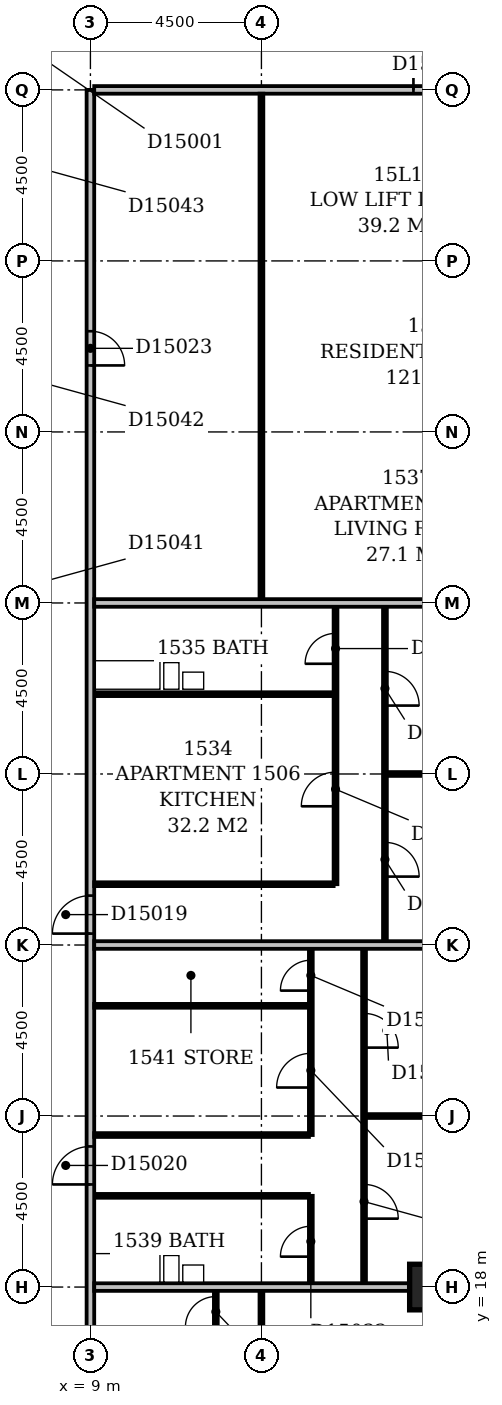
"""IFC4 building model, lengths in metres.
Left out: names, types, materials, properties, quantities, classifications, styles, units other than length and angle.
Written with IfcOpenShell. Run it as: python <this file> out.ifc"""

import sys

from ifc_helpers import new_model, si_unit, direction, frame, frame_2d, origin, origin_2d, place, context, subcontext, project, spatial, rectangle, extrude, element, fill, save


model = new_model("IFC4")
c1 = context("Model", 3, precision=1e-05, world=origin(), true_north=direction((0.0, 1.0)))
c2 = subcontext(c1, "Body", "Model", "MODEL_VIEW")
j1 = project(units=[si_unit("LENGTHUNIT", "METRE"), si_unit("PLANEANGLEUNIT", "RADIAN")], contexts=[c1])
p1 = place(None, origin())
s1 = spatial("IfcSite", under=j1, at=p1, CompositionType="ELEMENT")
p2 = place(p1, origin())
s2 = spatial("IfcBuilding", under=s1, at=p2, CompositionType="ELEMENT")
p3 = place(p2, frame((0.0, 0.0, 65.0)))
s3 = spatial("IfcBuildingStorey", under=s2, at=p3, CompositionType="ELEMENT", Elevation=65.0)
p4 = place(p3, frame((18.0, 18.0, -0.3), z_axis=(0.0, 0.0, 1.0), x_axis=(1.0, 0.0, 0.0)))
e1 = element("IfcColumn", 1, at=p4, inside=s3, PredefinedType="COLUMN", context=c2, shape_type="SweptSolid", body=[
    extrude(rectangle(XDim=1.2, YDim=1.2, at=origin_2d()), origin(), (0.0, 0.0, 1.0), 3.6),
])
p5 = place(p3, frame((9.0, 5.0, 0.0), z_axis=(0.0, 0.0, 1.0), x_axis=(0.0, 1.0, 0.0)))
e2 = element("IfcWall", 2, at=p5, inside=s3, PredefinedType="PARTITIONING", context=c2, shape_type="SweptSolid", body=[
    extrude(rectangle(XDim=44.5, YDim=0.2, at=frame_2d((22.25, 0.0))), origin(), (0.0, 0.0, 1.0), 3.3),
])
p6 = place(p5, frame((22.3, 0.0, 0.0)))
e3 = element("IfcOpeningElement", 3, at=p6, cuts=e2, PredefinedType="OPENING", context=c2, shape_type="SweptSolid", body=[
    extrude(rectangle(XDim=1.0, YDim=2.1, at=frame_2d((0.5, 1.05))), frame((0.0, 0.112, 0.0), z_axis=(0.0, -1.0, 0.0), x_axis=(1.0, 0.0, 0.0)), (0.0, 0.0, 1.0), 0.224),
])
p7 = place(p5, frame((15.7, 0.0, 0.0)))
e4 = element("IfcOpeningElement", 4, at=p7, cuts=e2, PredefinedType="OPENING", context=c2, shape_type="SweptSolid", body=[
    extrude(rectangle(XDim=1.0, YDim=2.1, at=frame_2d((0.5, 1.05))), frame((0.0, 0.112, 0.0), z_axis=(0.0, -1.0, 0.0), x_axis=(1.0, 0.0, 0.0)), (0.0, 0.0, 1.0), 0.224),
])
p8 = place(p5, frame((10.45, 0.0, 0.0)))
e5 = element("IfcOpeningElement", 5, at=p8, cuts=e2, PredefinedType="OPENING", context=c2, shape_type="SweptSolid", body=[
    extrude(rectangle(XDim=1.0, YDim=2.1, at=frame_2d((0.5, 1.05))), frame((0.0, 0.112, 0.0), z_axis=(0.0, -1.0, 0.0), x_axis=(1.0, 0.0, 0.0)), (0.0, 0.0, 1.0), 0.224),
])
p9 = place(p5, frame((5.95, 0.0, 0.0)))
e6 = element("IfcOpeningElement", 6, at=p9, cuts=e2, PredefinedType="OPENING", context=c2, shape_type="SweptSolid", body=[
    extrude(rectangle(XDim=1.0, YDim=2.1, at=frame_2d((0.5, 1.05))), frame((0.0, 0.112, 0.0), z_axis=(0.0, -1.0, 0.0), x_axis=(1.0, 0.0, 0.0)), (0.0, 0.0, 1.0), 0.224),
])
p10 = place(p5, frame((37.25, 0.0, 0.0)))
e7 = element("IfcOpeningElement", 7, at=p10, cuts=e2, PredefinedType="OPENING", context=c2, shape_type="SweptSolid", body=[
    extrude(rectangle(XDim=0.9, YDim=2.1, at=frame_2d((0.45, 1.05))), frame((0.0, 0.112, 0.0), z_axis=(0.0, -1.0, 0.0), x_axis=(1.0, 0.0, 0.0)), (0.0, 0.0, 1.0), 0.224),
])
p11 = place(p5, frame((1.5, 0.0, 0.0)))
e8 = element("IfcOpeningElement", 8, at=p11, cuts=e2, PredefinedType="OPENING", context=c2, shape_type="SweptSolid", body=[
    extrude(rectangle(XDim=0.9, YDim=2.1, at=frame_2d((0.45, 1.05))), frame((0.0, 0.112, 0.0), z_axis=(0.0, -1.0, 0.0), x_axis=(1.0, 0.0, 0.0)), (0.0, 0.0, 1.0), 0.224),
])
p12 = place(p3, frame((13.5, 9.6, 0.0), z_axis=(0.0, 0.0, 1.0), x_axis=(0.0, 1.0, 0.0)))
e9 = element("IfcWall", 9, at=p12, inside=s3, PredefinedType="PARTITIONING", context=c2, shape_type="SweptSolid", body=[
    extrude(rectangle(XDim=8.3, YDim=0.1, at=frame_2d((4.15, 0.0))), origin(), (0.0, 0.0, 1.0), 3.3),
])
p13 = place(p12, frame((5.7, 0.0, 0.0)))
e10 = element("IfcOpeningElement", 10, at=p13, cuts=e9, PredefinedType="OPENING", context=c2, shape_type="SweptSolid", body=[
    extrude(rectangle(XDim=0.9, YDim=2.1, at=frame_2d((0.45, 1.05))), frame((0.0, 0.062, 0.0), z_axis=(0.0, -1.0, 0.0), x_axis=(1.0, 0.0, 0.0)), (0.0, 0.0, 1.0), 0.124),
])
p14 = place(p12, frame((1.2, 0.0, 0.0)))
e11 = element("IfcOpeningElement", 11, at=p14, cuts=e9, PredefinedType="OPENING", context=c2, shape_type="SweptSolid", body=[
    extrude(rectangle(XDim=0.9, YDim=2.1, at=frame_2d((0.45, 1.05))), frame((0.0, 0.062, 0.0), z_axis=(0.0, -1.0, 0.0), x_axis=(1.0, 0.0, 0.0)), (0.0, 0.0, 1.0), 0.124),
])
p15 = place(p3, frame((12.3, 16.7, 0.0), z_axis=(0.0, 0.0, 1.0), x_axis=(0.0, 1.0, 0.0)))
e12 = element("IfcWall", 12, at=p15, inside=s3, PredefinedType="PARTITIONING", context=c2, shape_type="SweptSolid", body=[
    extrude(rectangle(XDim=1.2, YDim=0.1, at=frame_2d((0.6, 0.0))), origin(), (0.0, 0.0, 1.0), 3.3),
])
p16 = place(p15, frame((0.25, 0.0, 0.0)))
e13 = element("IfcOpeningElement", 13, at=p16, cuts=e12, PredefinedType="OPENING", context=c2, shape_type="SweptSolid", body=[
    extrude(rectangle(XDim=0.8, YDim=2.1, at=frame_2d((0.4, 1.05))), frame((0.0, 0.062, 0.0), z_axis=(0.0, -1.0, 0.0), x_axis=(1.0, 0.0, 0.0)), (0.0, 0.0, 1.0), 0.124),
])
p17 = place(p3, frame((9.1, 18.0, 0.0), z_axis=(0.0, 0.0, 1.0), x_axis=(1.0, 0.0, 0.0)))
e14 = element("IfcWall", 14, at=p17, inside=s3, PredefinedType="PARTITIONING", context=c2, shape_type="SweptSolid", body=[
    extrude(rectangle(XDim=8.3, YDim=0.2, at=frame_2d((4.15, 0.0))), origin(), (0.0, 0.0, 1.0), 2.6),
])
p18 = place(p3, frame((14.8, 18.1, 0.0), z_axis=(0.0, 0.0, 1.0), x_axis=(0.0, 1.0, 0.0)))
e15 = element("IfcWall", 15, at=p18, inside=s3, PredefinedType="PARTITIONING", context=c2, shape_type="SweptSolid", body=[
    extrude(rectangle(XDim=2.3, YDim=0.1, at=frame_2d((1.15, 0.0))), origin(), (0.0, 0.0, 1.0), 3.3),
])
p19 = place(p18, frame((0.7, 0.0, 0.0)))
e16 = element("IfcOpeningElement", 16, at=p19, cuts=e15, PredefinedType="OPENING", context=c2, shape_type="SweptSolid", body=[
    extrude(rectangle(XDim=0.8, YDim=2.1, at=frame_2d((0.4, 1.05))), frame((0.0, 0.062, 0.0), z_axis=(0.0, -1.0, 0.0), x_axis=(1.0, 0.0, 0.0)), (0.0, 0.0, 1.0), 0.124),
])
p20 = place(p3, frame((16.2, 18.1, 0.0), z_axis=(0.0, 0.0, 1.0), x_axis=(0.0, 1.0, 0.0)))
e17 = element("IfcWall", 17, at=p20, inside=s3, PredefinedType="PARTITIONING", context=c2, shape_type="SweptSolid", body=[
    extrude(rectangle(XDim=8.8, YDim=0.1, at=frame_2d((4.4, 0.0))), origin(), (0.0, 0.0, 1.0), 3.3),
])
p21 = place(p20, frame((1.7, 0.0, 0.0)))
e18 = element("IfcOpeningElement", 18, at=p21, cuts=e17, PredefinedType="OPENING", context=c2, shape_type="SweptSolid", body=[
    extrude(rectangle(XDim=0.9, YDim=2.1, at=frame_2d((0.45, 1.05))), frame((0.0, 0.062, 0.0), z_axis=(0.0, -1.0, 0.0), x_axis=(1.0, 0.0, 0.0)), (0.0, 0.0, 1.0), 0.124),
])
p22 = place(p20, frame((6.2, 0.0, 0.0)))
e19 = element("IfcOpeningElement", 19, at=p22, cuts=e17, PredefinedType="OPENING", context=c2, shape_type="SweptSolid", body=[
    extrude(rectangle(XDim=0.9, YDim=2.1, at=frame_2d((0.45, 1.05))), frame((0.0, 0.062, 0.0), z_axis=(0.0, -1.0, 0.0), x_axis=(1.0, 0.0, 0.0)), (0.0, 0.0, 1.0), 0.124),
])
p23 = place(p3, frame((9.1, 20.4, 0.0), z_axis=(0.0, 0.0, 1.0), x_axis=(1.0, 0.0, 0.0)))
e20 = element("IfcWall", 20, at=p23, inside=s3, PredefinedType="PLUMBINGWALL", context=c2, shape_type="SweptSolid", body=[
    extrude(rectangle(XDim=5.65, YDim=0.1, at=frame_2d((2.825, 0.0))), origin(), (0.0, 0.0, 1.0), 3.3),
])
p24 = place(p3, frame((9.1, 22.0, 0.0), z_axis=(0.0, 0.0, 1.0), x_axis=(1.0, 0.0, 0.0)))
e21 = element("IfcWall", 21, at=p24, inside=s3, PredefinedType="PARTITIONING", context=c2, shape_type="SweptSolid", body=[
    extrude(rectangle(XDim=5.65, YDim=0.1, at=frame_2d((2.825, 0.0))), origin(), (0.0, 0.0, 1.0), 3.3),
])
p25 = place(p3, frame((14.8, 22.0, 0.0), z_axis=(0.0, 0.0, 1.0), x_axis=(0.0, 1.0, 0.0)))
e22 = element("IfcWall", 22, at=p25, inside=s3, PredefinedType="PARTITIONING", context=c2, shape_type="SweptSolid", body=[
    extrude(rectangle(XDim=4.9, YDim=0.1, at=frame_2d((2.45, 0.0))), origin(), (0.0, 0.0, 1.0), 3.3),
])
p26 = place(p25, frame((1.25, 0.0, 0.0)))
e23 = element("IfcOpeningElement", 23, at=p26, cuts=e22, PredefinedType="OPENING", context=c2, shape_type="SweptSolid", body=[
    extrude(rectangle(XDim=0.9, YDim=2.1, at=frame_2d((0.45, 1.05))), frame((0.0, 0.062, 0.0), z_axis=(0.0, -1.0, 0.0), x_axis=(1.0, 0.0, 0.0)), (0.0, 0.0, 1.0), 0.124),
])
p27 = place(p25, frame((3.8, 0.0, 0.0)))
e24 = element("IfcOpeningElement", 24, at=p27, cuts=e22, PredefinedType="OPENING", context=c2, shape_type="SweptSolid", body=[
    extrude(rectangle(XDim=0.8, YDim=2.1, at=frame_2d((0.4, 1.05))), frame((0.0, 0.062, 0.0), z_axis=(0.0, -1.0, 0.0), x_axis=(1.0, 0.0, 0.0)), (0.0, 0.0, 1.0), 0.124),
])
for number, where, z_axis, x_axis in (
    (25, (16.25, 22.5, 0.0), (0.0, 0.0, 1.0), (1.0, 0.0, 0.0)),
    (26, (9.1, 25.4, 0.0), (0.0, 0.0, 1.0), (1.0, 0.0, 0.0)),
):
    element("IfcWall", number, at=place(p3, frame(where, z_axis=z_axis, x_axis=x_axis)), inside=s3, PredefinedType="PARTITIONING", context=c2, shape_type="SweptSolid", body=[
        extrude(rectangle(XDim=5.65, YDim=0.1, at=frame_2d((2.825, 0.0))), origin(), (0.0, 0.0, 1.0), 3.3),
    ])
p28 = place(p3, frame((9.1, 27.0, 0.0), z_axis=(0.0, 0.0, 1.0), x_axis=(1.0, 0.0, 0.0)))
e27 = element("IfcWall", 27, at=p28, inside=s3, PredefinedType="PARTITIONING", context=c2, shape_type="SweptSolid", body=[
    extrude(rectangle(XDim=12.8, YDim=0.2, at=frame_2d((6.4, 0.0))), origin(), (0.0, 0.0, 1.0), 2.7),
])
p29 = place(p3, frame((16.75, 27.1, 0.0), z_axis=(0.0, 0.0, 1.0), x_axis=(0.0, 1.0, 0.0)))
e28 = element("IfcWall", 28, at=p29, inside=s3, PredefinedType="PARTITIONING", context=c2, shape_type="SweptSolid", body=[
    extrude(rectangle(XDim=8.8, YDim=0.1, at=frame_2d((4.4, 0.0))), origin(), (0.0, 0.0, 1.0), 3.3),
])
p30 = place(p29, frame((1.7, 0.0, 0.0)))
e29 = element("IfcOpeningElement", 29, at=p30, cuts=e28, PredefinedType="OPENING", context=c2, shape_type="SweptSolid", body=[
    extrude(rectangle(XDim=0.9, YDim=2.1, at=frame_2d((0.45, 1.05))), frame((0.0, 0.062, 0.0), z_axis=(0.0, -1.0, 0.0), x_axis=(1.0, 0.0, 0.0)), (0.0, 0.0, 1.0), 0.124),
])
p31 = place(p29, frame((6.2, 0.0, 0.0)))
e30 = element("IfcOpeningElement", 30, at=p31, cuts=e28, PredefinedType="OPENING", context=c2, shape_type="SweptSolid", body=[
    extrude(rectangle(XDim=0.9, YDim=2.1, at=frame_2d((0.45, 1.05))), frame((0.0, 0.062, 0.0), z_axis=(0.0, -1.0, 0.0), x_axis=(1.0, 0.0, 0.0)), (0.0, 0.0, 1.0), 0.124),
])
p32 = place(p3, frame((9.1, 28.6, 0.0), z_axis=(0.0, 0.0, 1.0), x_axis=(1.0, 0.0, 0.0)))
e31 = element("IfcWall", 31, at=p32, inside=s3, PredefinedType="PARTITIONING", context=c2, shape_type="SweptSolid", body=[
    extrude(rectangle(XDim=6.3, YDim=0.1, at=frame_2d((3.15, 0.0))), origin(), (0.0, 0.0, 1.0), 3.3),
])
p33 = place(p3, frame((15.45, 28.6, 0.0), z_axis=(0.0, 0.0, 1.0), x_axis=(0.0, 1.0, 0.0)))
e32 = element("IfcWall", 32, at=p33, inside=s3, PredefinedType="PARTITIONING", context=c2, shape_type="SweptSolid", body=[
    extrude(rectangle(XDim=7.3, YDim=0.1, at=frame_2d((3.65, 0.0))), origin(), (0.0, 0.0, 1.0), 3.3),
])
p34 = place(p33, frame((5.8, 0.0, 0.0)))
e33 = element("IfcOpeningElement", 33, at=p34, cuts=e32, PredefinedType="OPENING", context=c2, shape_type="SweptSolid", body=[
    extrude(rectangle(XDim=0.8, YDim=2.1, at=frame_2d((0.4, 1.05))), frame((0.0, 0.062, 0.0), z_axis=(0.0, -1.0, 0.0), x_axis=(1.0, 0.0, 0.0)), (0.0, 0.0, 1.0), 0.124),
])
p35 = place(p33, frame((2.05, 0.0, 0.0)))
e34 = element("IfcOpeningElement", 34, at=p35, cuts=e32, PredefinedType="OPENING", context=c2, shape_type="SweptSolid", body=[
    extrude(rectangle(XDim=0.9, YDim=2.1, at=frame_2d((0.45, 1.05))), frame((0.0, 0.062, 0.0), z_axis=(0.0, -1.0, 0.0), x_axis=(1.0, 0.0, 0.0)), (0.0, 0.0, 1.0), 0.124),
])
p36 = place(p3, frame((16.8, 31.5, 0.0), z_axis=(0.0, 0.0, 1.0), x_axis=(1.0, 0.0, 0.0)))
e35 = element("IfcWall", 35, at=p36, inside=s3, PredefinedType="PARTITIONING", context=c2, shape_type="SweptSolid", body=[
    extrude(rectangle(XDim=5.1, YDim=0.1, at=frame_2d((2.55, 0.0))), origin(), (0.0, 0.0, 1.0), 3.3),
])
p37 = place(p3, frame((9.1, 33.6, 0.0), z_axis=(0.0, 0.0, 1.0), x_axis=(1.0, 0.0, 0.0)))
e36 = element("IfcWall", 36, at=p37, inside=s3, PredefinedType="PLUMBINGWALL", context=c2, shape_type="SweptSolid", body=[
    extrude(rectangle(XDim=6.3, YDim=0.1, at=frame_2d((3.15, 0.0))), origin(), (0.0, 0.0, 1.0), 3.3),
])
p38 = place(p3, frame((9.1, 36.0, 0.0), z_axis=(0.0, 0.0, 1.0), x_axis=(1.0, 0.0, 0.0)))
e37 = element("IfcWall", 37, at=p38, inside=s3, PredefinedType="PARTITIONING", context=c2, shape_type="SweptSolid", body=[
    extrude(rectangle(XDim=12.8, YDim=0.2, at=frame_2d((6.4, 0.0))), origin(), (0.0, 0.0, 1.0), 2.4),
])
p39 = place(p3, frame((13.5, 36.1, 0.0), z_axis=(0.0, 0.0, 1.0), x_axis=(0.0, 1.0, 0.0)))
e38 = element("IfcWall", 38, at=p39, inside=s3, PredefinedType="PARTITIONING", context=c2, shape_type="SweptSolid", body=[
    extrude(rectangle(XDim=13.3, YDim=0.1, at=frame_2d((6.65, 0.0))), origin(), (0.0, 0.0, 1.0), 3.3),
])
p40 = place(p3, frame((9.1, 49.5, 0.0), z_axis=(0.0, 0.0, 1.0), x_axis=(1.0, 0.0, 0.0)))
e39 = element("IfcWall", 39, at=p40, inside=s3, PredefinedType="PARTITIONING", context=c2, shape_type="SweptSolid", body=[
    extrude(rectangle(XDim=57.8, YDim=0.2, at=frame_2d((28.9, 0.0))), origin(), (0.0, 0.0, 1.0), 3.3),
])
p41 = place(p40, frame((13.7, 0.0, 0.0)))
e40 = element("IfcOpeningElement", 40, at=p41, cuts=e39, PredefinedType="OPENING", context=c2, shape_type="SweptSolid", body=[
    extrude(rectangle(XDim=1.0, YDim=2.1, at=frame_2d((0.5, 1.05))), frame((0.0, 0.112, 0.0), z_axis=(0.0, -1.0, 0.0), x_axis=(1.0, 0.0, 0.0)), (0.0, 0.0, 1.0), 0.224),
])
p42 = place(p40, frame((32.2, 0.0, 0.0)))
e41 = element("IfcOpeningElement", 41, at=p42, cuts=e39, PredefinedType="OPENING", context=c2, shape_type="SweptSolid", body=[
    extrude(rectangle(XDim=1.0, YDim=2.1, at=frame_2d((0.5, 1.05))), frame((0.0, 0.112, 0.0), z_axis=(0.0, -1.0, 0.0), x_axis=(1.0, 0.0, 0.0)), (0.0, 0.0, 1.0), 0.224),
])
p43 = place(p40, frame((37.85, 0.0, 0.0)))
e42 = element("IfcOpeningElement", 42, at=p43, cuts=e39, PredefinedType="OPENING", context=c2, shape_type="SweptSolid", body=[
    extrude(rectangle(XDim=1.0, YDim=2.1, at=frame_2d((0.5, 1.05))), frame((0.0, 0.112, 0.0), z_axis=(0.0, -1.0, 0.0), x_axis=(1.0, 0.0, 0.0)), (0.0, 0.0, 1.0), 0.224),
])
p44 = place(p40, frame((45.7, 0.0, 0.0)))
e43 = element("IfcOpeningElement", 43, at=p44, cuts=e39, PredefinedType="OPENING", context=c2, shape_type="SweptSolid", body=[
    extrude(rectangle(XDim=1.0, YDim=2.1, at=frame_2d((0.5, 1.05))), frame((0.0, 0.112, 0.0), z_axis=(0.0, -1.0, 0.0), x_axis=(1.0, 0.0, 0.0)), (0.0, 0.0, 1.0), 0.224),
])
p45 = place(p40, frame((49.7, 0.0, 0.0)))
e44 = element("IfcOpeningElement", 44, at=p45, cuts=e39, PredefinedType="OPENING", context=c2, shape_type="SweptSolid", body=[
    extrude(rectangle(XDim=1.0, YDim=2.1, at=frame_2d((0.5, 1.05))), frame((0.0, 0.112, 0.0), z_axis=(0.0, -1.0, 0.0), x_axis=(1.0, 0.0, 0.0)), (0.0, 0.0, 1.0), 0.224),
])
p46 = place(p40, frame((8.4, 0.0, 0.0)))
e45 = element("IfcOpeningElement", 45, at=p46, cuts=e39, PredefinedType="OPENING", context=c2, shape_type="SweptSolid", body=[
    extrude(rectangle(XDim=0.9, YDim=2.1, at=frame_2d((0.45, 1.05))), frame((0.0, 0.112, 0.0), z_axis=(0.0, -1.0, 0.0), x_axis=(1.0, 0.0, 0.0)), (0.0, 0.0, 1.0), 0.224),
])
p47 = place(p6, origin())
e46 = element("IfcDoor", 46, at=p47, inside=s3, OperationType="SINGLE_SWING_LEFT", PredefinedType="DOOR", context=c2, shape_type="SweptSolid", body=[
    extrude(rectangle(XDim=1.0, YDim=2.1, at=frame_2d((0.5, 1.05))), frame((0.0, 0.025, 0.0), z_axis=(0.0, -1.0, 0.0), x_axis=(1.0, 0.0, 0.0)), (0.0, 0.0, 1.0), 0.05),
])
fill(e3, e46)
p48 = place(p7, origin())
e47 = element("IfcDoor", 47, at=p48, inside=s3, OperationType="SINGLE_SWING_LEFT", PredefinedType="DOOR", context=c2, shape_type="SweptSolid", body=[
    extrude(rectangle(XDim=1.0, YDim=2.1, at=frame_2d((0.5, 1.05))), frame((0.0, 0.025, 0.0), z_axis=(0.0, -1.0, 0.0), x_axis=(1.0, 0.0, 0.0)), (0.0, 0.0, 1.0), 0.05),
])
fill(e4, e47)
p49 = place(p10, frame((0.9, 0.0, 0.0), z_axis=(0.0, 0.0, 1.0), x_axis=(-1.0, 0.0, 0.0)))
e48 = element("IfcDoor", 48, at=p49, inside=s3, OperationType="SINGLE_SWING_RIGHT", PredefinedType="DOOR", context=c2, shape_type="SweptSolid", body=[
    extrude(rectangle(XDim=0.9, YDim=2.1, at=frame_2d((0.45, 1.05))), frame((0.0, 0.025, 0.0), z_axis=(0.0, -1.0, 0.0), x_axis=(1.0, 0.0, 0.0)), (0.0, 0.0, 1.0), 0.05),
])
fill(e7, e48)
p50 = place(p16, origin())
e49 = element("IfcDoor", 49, at=p50, inside=s3, OperationType="SINGLE_SWING_LEFT", PredefinedType="DOOR", context=c2, shape_type="SweptSolid", body=[
    extrude(rectangle(XDim=0.8, YDim=2.1, at=frame_2d((0.4, 1.05))), frame((0.0, 0.025, 0.0), z_axis=(0.0, -1.0, 0.0), x_axis=(1.0, 0.0, 0.0)), (0.0, 0.0, 1.0), 0.05),
])
fill(e13, e49)
p51 = place(p19, origin())
e50 = element("IfcDoor", 50, at=p51, inside=s3, OperationType="SINGLE_SWING_LEFT", PredefinedType="DOOR", context=c2, shape_type="SweptSolid", body=[
    extrude(rectangle(XDim=0.8, YDim=2.1, at=frame_2d((0.4, 1.05))), frame((0.0, 0.025, 0.0), z_axis=(0.0, -1.0, 0.0), x_axis=(1.0, 0.0, 0.0)), (0.0, 0.0, 1.0), 0.05),
])
fill(e16, e50)
p52 = place(p21, frame((0.9, 0.0, 0.0), z_axis=(0.0, 0.0, 1.0), x_axis=(-1.0, 0.0, 0.0)))
e51 = element("IfcDoor", 51, at=p52, inside=s3, OperationType="SINGLE_SWING_RIGHT", PredefinedType="DOOR", context=c2, shape_type="SweptSolid", body=[
    extrude(rectangle(XDim=0.9, YDim=2.1, at=frame_2d((0.45, 1.05))), frame((0.0, 0.025, 0.0), z_axis=(0.0, -1.0, 0.0), x_axis=(1.0, 0.0, 0.0)), (0.0, 0.0, 1.0), 0.05),
])
fill(e18, e51)
p53 = place(p22, frame((0.9, 0.0, 0.0), z_axis=(0.0, 0.0, 1.0), x_axis=(-1.0, 0.0, 0.0)))
e52 = element("IfcDoor", 52, at=p53, inside=s3, OperationType="SINGLE_SWING_RIGHT", PredefinedType="DOOR", context=c2, shape_type="SweptSolid", body=[
    extrude(rectangle(XDim=0.9, YDim=2.1, at=frame_2d((0.45, 1.05))), frame((0.0, 0.025, 0.0), z_axis=(0.0, -1.0, 0.0), x_axis=(1.0, 0.0, 0.0)), (0.0, 0.0, 1.0), 0.05),
])
fill(e19, e52)
p54 = place(p26, origin())
e53 = element("IfcDoor", 53, at=p54, inside=s3, OperationType="SINGLE_SWING_LEFT", PredefinedType="DOOR", context=c2, shape_type="SweptSolid", body=[
    extrude(rectangle(XDim=0.9, YDim=2.1, at=frame_2d((0.45, 1.05))), frame((0.0, 0.025, 0.0), z_axis=(0.0, -1.0, 0.0), x_axis=(1.0, 0.0, 0.0)), (0.0, 0.0, 1.0), 0.05),
])
fill(e23, e53)
p55 = place(p27, origin())
e54 = element("IfcDoor", 54, at=p55, inside=s3, OperationType="SINGLE_SWING_LEFT", PredefinedType="DOOR", context=c2, shape_type="SweptSolid", body=[
    extrude(rectangle(XDim=0.8, YDim=2.1, at=frame_2d((0.4, 1.05))), frame((0.0, 0.025, 0.0), z_axis=(0.0, -1.0, 0.0), x_axis=(1.0, 0.0, 0.0)), (0.0, 0.0, 1.0), 0.05),
])
fill(e24, e54)
p56 = place(p30, frame((0.9, 0.0, 0.0), z_axis=(0.0, 0.0, 1.0), x_axis=(-1.0, 0.0, 0.0)))
e55 = element("IfcDoor", 55, at=p56, inside=s3, OperationType="SINGLE_SWING_RIGHT", PredefinedType="DOOR", context=c2, shape_type="SweptSolid", body=[
    extrude(rectangle(XDim=0.9, YDim=2.1, at=frame_2d((0.45, 1.05))), frame((0.0, 0.025, 0.0), z_axis=(0.0, -1.0, 0.0), x_axis=(1.0, 0.0, 0.0)), (0.0, 0.0, 1.0), 0.05),
])
fill(e29, e55)
p57 = place(p31, frame((0.9, 0.0, 0.0), z_axis=(0.0, 0.0, 1.0), x_axis=(-1.0, 0.0, 0.0)))
e56 = element("IfcDoor", 56, at=p57, inside=s3, OperationType="SINGLE_SWING_RIGHT", PredefinedType="DOOR", context=c2, shape_type="SweptSolid", body=[
    extrude(rectangle(XDim=0.9, YDim=2.1, at=frame_2d((0.45, 1.05))), frame((0.0, 0.025, 0.0), z_axis=(0.0, -1.0, 0.0), x_axis=(1.0, 0.0, 0.0)), (0.0, 0.0, 1.0), 0.05),
])
fill(e30, e56)
p58 = place(p34, origin())
e57 = element("IfcDoor", 57, at=p58, inside=s3, OperationType="SINGLE_SWING_LEFT", PredefinedType="DOOR", context=c2, shape_type="SweptSolid", body=[
    extrude(rectangle(XDim=0.8, YDim=2.1, at=frame_2d((0.4, 1.05))), frame((0.0, 0.025, 0.0), z_axis=(0.0, -1.0, 0.0), x_axis=(1.0, 0.0, 0.0)), (0.0, 0.0, 1.0), 0.05),
])
fill(e33, e57)
p59 = place(p35, origin())
e58 = element("IfcDoor", 58, at=p59, inside=s3, OperationType="SINGLE_SWING_LEFT", PredefinedType="DOOR", context=c2, shape_type="SweptSolid", body=[
    extrude(rectangle(XDim=0.9, YDim=2.1, at=frame_2d((0.45, 1.05))), frame((0.0, 0.025, 0.0), z_axis=(0.0, -1.0, 0.0), x_axis=(1.0, 0.0, 0.0)), (0.0, 0.0, 1.0), 0.05),
])
fill(e34, e58)
p60 = place(p46, origin())
e59 = element("IfcDoor", 59, at=p60, inside=s3, OperationType="SINGLE_SWING_LEFT", PredefinedType="DOOR", context=c2, shape_type="SweptSolid", body=[
    extrude(rectangle(XDim=0.9, YDim=2.1, at=frame_2d((0.45, 1.05))), frame((0.0, 0.025, 0.0), z_axis=(0.0, -1.0, 0.0), x_axis=(1.0, 0.0, 0.0)), (0.0, 0.0, 1.0), 0.05),
])
fill(e45, e59)
save(model, sys.argv[1])
